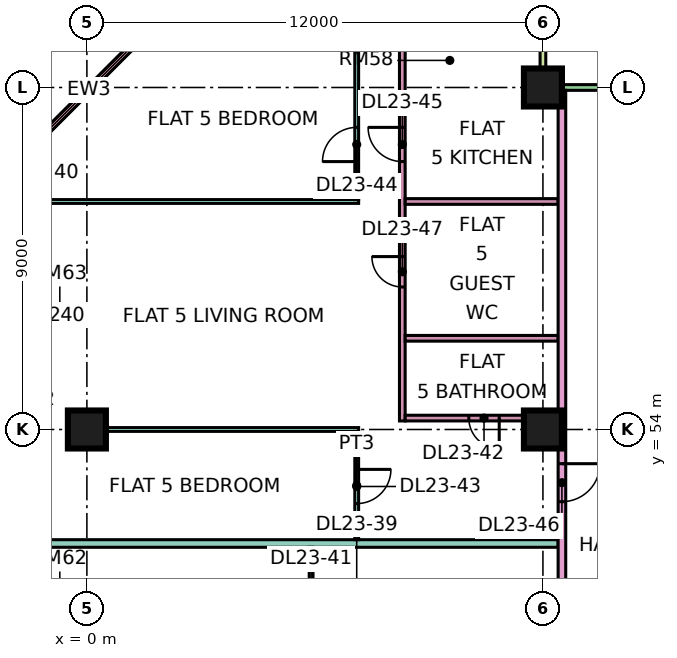
"""IFC4 building model, lengths in metres.
Left out: names, types, materials, properties, quantities, classifications, styles, units other than length and angle.
Written with IfcOpenShell. Run it as: python <this file> out.ifc"""

import sys

from ifc_helpers import new_model, si_unit, direction, frame, frame_2d, origin, origin_2d, place, context, subcontext, project, spatial, rectangle, extrude, element, fill, save


model = new_model("IFC4")
c1 = context("Model", 3, precision=1e-05, world=origin(), true_north=direction((0.0, 1.0)))
c2 = subcontext(c1, "Body", "Model", "MODEL_VIEW")
j1 = project(units=[si_unit("LENGTHUNIT", "METRE"), si_unit("PLANEANGLEUNIT", "RADIAN")], contexts=[c1])
p1 = place(None, origin())
s1 = spatial("IfcSite", under=j1, at=p1, CompositionType="ELEMENT")
p2 = place(p1, origin())
s2 = spatial("IfcBuilding", under=s1, at=p2, CompositionType="ELEMENT")
p3 = place(p2, frame((0.0, 0.0, 103.15)))
s3 = spatial("IfcBuildingStorey", under=s2, at=p3, CompositionType="ELEMENT", Elevation=103.15)
p4 = place(p3, frame((0.0, 54.0, 0.0), z_axis=(0.0, 0.0, 1.0), x_axis=(1.0, 0.0, 0.0)))
e1 = element("IfcColumn", 1, at=p4, inside=s3, PredefinedType="COLUMN", context=c2, shape_type="SweptSolid", body=[
    extrude(rectangle(XDim=1.0, YDim=1.0, at=origin_2d()), origin(), (0.0, 0.0, 1.0), 3.75),
])
for number, where, z_axis, x_axis in (
    (2, (12.0, 54.0, 0.0), (0.0, 0.0, 1.0), (1.0, 0.0, 0.0)),
    (3, (12.0, 63.0, 0.0), (0.0, 0.0, 1.0), (1.0, 0.0, 0.0)),
):
    element("IfcColumn", number, at=place(p3, frame(where, z_axis=z_axis, x_axis=x_axis)), inside=s3, PredefinedType="COLUMN", context=c2, shape_type="SweptSolid", body=[
        extrude(rectangle(XDim=1.0, YDim=1.0, at=origin_2d()), origin(), (0.0, 0.0, 1.0), 3.75),
    ])
p5 = place(p3, frame((22.425, 63.0, 0.0), z_axis=(0.0, 0.0, 1.0), x_axis=(-1.0, 0.0, 0.0)))
e4 = element("IfcWall", 4, at=p5, inside=s3, PredefinedType="SOLIDWALL", context=c2, shape_type="SweptSolid", body=[
    extrude(rectangle(XDim=10.35, YDim=0.15, at=frame_2d((5.175, 0.0))), origin(), (0.0, 0.0, 1.0), 3.35),
])
p6 = place(p5, frame((0.562, 0.0, 0.45)))
e5 = element("IfcOpeningElement", 5, at=p6, cuts=e4, PredefinedType="OPENING", context=c2, shape_type="SweptSolid", body=[
    extrude(rectangle(XDim=1.8, YDim=2.4, at=frame_2d((0.9, 1.2))), frame((0.0, 0.085, 0.0), z_axis=(0.0, -1.0, 0.0), x_axis=(1.0, 0.0, 0.0)), (0.0, 0.0, 1.0), 0.17),
])
p7 = place(p5, frame((3.975, 0.0, 0.0)))
e6 = element("IfcOpeningElement", 6, at=p7, cuts=e4, PredefinedType="OPENING", context=c2, shape_type="SweptSolid", body=[
    extrude(rectangle(XDim=1.8, YDim=2.4, at=frame_2d((0.9, 1.2))), frame((0.0, 0.085, 0.0), z_axis=(0.0, -1.0, 0.0), x_axis=(1.0, 0.0, 0.0)), (0.0, 0.0, 1.0), 0.17),
])
p8 = place(p3, frame((12.0, 64.5, 0.0), z_axis=(0.0, 0.0, 1.0), x_axis=(0.0, -1.0, 0.0)))
e7 = element("IfcWall", 7, at=p8, inside=s3, PredefinedType="SOLIDWALL", context=c2, shape_type="SweptSolid", body=[
    extrude(rectangle(XDim=1.5, YDim=0.15, at=frame_2d((0.75, 0.0))), origin(), (0.0, 0.0, 1.0), 3.35),
])
p9 = place(p3, frame((1.553, 64.447, 0.0), z_axis=(0.0, 0.0, 1.0), x_axis=(-0.707106781187, -0.707106781187, 0.0)))
e8 = element("IfcWall", 8, at=p9, inside=s3, PredefinedType="SOLIDWALL", context=c2, shape_type="SweptSolid", body=[
    extrude(rectangle(XDim=4.243, YDim=0.15, at=frame_2d((2.121, 0.0))), origin(), (0.0, 0.0, 1.0), 3.35),
])
p10 = place(p9, frame((0.621, 0.0, 0.45)))
e9 = element("IfcOpeningElement", 9, at=p10, cuts=e8, PredefinedType="OPENING", context=c2, shape_type="SweptSolid", body=[
    extrude(rectangle(XDim=3.0, YDim=2.4, at=frame_2d((1.5, 1.2))), frame((0.0, 0.085, 0.0), z_axis=(0.0, -1.0, 0.0), x_axis=(1.0, 0.0, 0.0)), (0.0, 0.0, 1.0), 0.17),
])
p11 = place(p3, frame((-1.35, 51.0, 0.0), z_axis=(0.0, 0.0, 1.0), x_axis=(1.0, 0.0, 0.0)))
e10 = element("IfcWall", 10, at=p11, inside=s3, PredefinedType="PARTITIONING", context=c2, shape_type="SweptSolid", body=[
    extrude(rectangle(XDim=13.75, YDim=0.2, at=frame_2d((6.875, 0.0))), origin(), (0.0, 0.0, 1.0), 3.35),
])
e11 = element("IfcWall", 11, at=p4, inside=s3, PredefinedType="PARTITIONING", context=c2, shape_type="SweptSolid", body=[
    extrude(rectangle(XDim=7.15, YDim=0.1, at=frame_2d((3.575, 0.0))), origin(), (0.0, 0.0, 1.0), 3.35),
])
p12 = place(p3, frame((-1.35, 60.0, 0.0), z_axis=(0.0, 0.0, 1.0), x_axis=(1.0, 0.0, 0.0)))
e12 = element("IfcWall", 12, at=p12, inside=s3, PredefinedType="PARTITIONING", context=c2, shape_type="SweptSolid", body=[
    extrude(rectangle(XDim=8.5, YDim=0.1, at=frame_2d((4.25, 0.0))), origin(), (0.0, 0.0, 1.0), 3.35),
])
p13 = place(p3, frame((5.9, 38.95, 0.0), z_axis=(0.0, 0.0, 1.0), x_axis=(0.0, 1.0, 0.0)))
e13 = element("IfcWall", 13, at=p13, inside=s3, PredefinedType="PARTITIONING", context=c2, shape_type="SweptSolid", body=[
    extrude(rectangle(XDim=11.95, YDim=0.1, at=frame_2d((5.975, 0.0))), origin(), (0.0, 0.0, 1.0), 3.35),
])
p14 = place(p13, frame((1.1, 0.0, 0.0)))
e14 = element("IfcOpeningElement", 14, at=p14, cuts=e13, PredefinedType="OPENING", context=c2, shape_type="SweptSolid", body=[
    extrude(rectangle(XDim=0.9, YDim=2.1, at=frame_2d((0.45, 1.05))), frame((0.0, 0.06, 0.0), z_axis=(0.0, -1.0, 0.0), x_axis=(1.0, 0.0, 0.0)), (0.0, 0.0, 1.0), 0.12),
])
p15 = place(p13, frame((4.1, 0.0, 0.0)))
e15 = element("IfcOpeningElement", 15, at=p15, cuts=e13, PredefinedType="OPENING", context=c2, shape_type="SweptSolid", body=[
    extrude(rectangle(XDim=0.9, YDim=2.1, at=frame_2d((0.45, 1.05))), frame((0.0, 0.06, 0.0), z_axis=(0.0, -1.0, 0.0), x_axis=(1.0, 0.0, 0.0)), (0.0, 0.0, 1.0), 0.12),
])
p16 = place(p13, frame((7.1, 0.0, 0.0)))
e16 = element("IfcOpeningElement", 16, at=p16, cuts=e13, PredefinedType="OPENING", context=c2, shape_type="SweptSolid", body=[
    extrude(rectangle(XDim=0.9, YDim=2.1, at=frame_2d((0.45, 1.05))), frame((0.0, 0.06, 0.0), z_axis=(0.0, -1.0, 0.0), x_axis=(1.0, 0.0, 0.0)), (0.0, 0.0, 1.0), 0.12),
])
p17 = place(p13, frame((10.1, 0.0, 0.0)))
e17 = element("IfcOpeningElement", 17, at=p17, cuts=e13, PredefinedType="OPENING", context=c2, shape_type="SweptSolid", body=[
    extrude(rectangle(XDim=0.9, YDim=2.1, at=frame_2d((0.45, 1.05))), frame((0.0, 0.06, 0.0), z_axis=(0.0, -1.0, 0.0), x_axis=(1.0, 0.0, 0.0)), (0.0, 0.0, 1.0), 0.12),
])
p18 = place(p3, frame((7.1, 51.1, 0.0), z_axis=(0.0, 0.0, 1.0), x_axis=(0.0, 1.0, 0.0)))
e18 = element("IfcWall", 18, at=p18, inside=s3, PredefinedType="PARTITIONING", context=c2, shape_type="SweptSolid", body=[
    extrude(rectangle(XDim=2.85, YDim=0.1, at=frame_2d((1.425, 0.0))), origin(), (0.0, 0.0, 1.0), 3.35),
])
p19 = place(p18, frame((0.95, 0.0, 0.0)))
e19 = element("IfcOpeningElement", 19, at=p19, cuts=e18, PredefinedType="OPENING", context=c2, shape_type="SweptSolid", body=[
    extrude(rectangle(XDim=0.9, YDim=2.1, at=frame_2d((0.45, 1.05))), frame((0.0, 0.06, 0.0), z_axis=(0.0, -1.0, 0.0), x_axis=(1.0, 0.0, 0.0)), (0.0, 0.0, 1.0), 0.12),
])
p20 = place(p3, frame((7.1, 60.05, 0.0), z_axis=(0.0, 0.0, 1.0), x_axis=(0.0, 1.0, 0.0)))
e20 = element("IfcWall", 20, at=p20, inside=s3, PredefinedType="PARTITIONING", context=c2, shape_type="SweptSolid", body=[
    extrude(rectangle(XDim=4.3, YDim=0.1, at=frame_2d((2.15, 0.0))), origin(), (0.0, 0.0, 1.0), 3.35),
])
p21 = place(p20, frame((1.0, 0.0, 0.0)))
e21 = element("IfcOpeningElement", 21, at=p21, cuts=e20, PredefinedType="OPENING", context=c2, shape_type="SweptSolid", body=[
    extrude(rectangle(XDim=0.9, YDim=2.1, at=frame_2d((0.45, 1.05))), frame((0.0, 0.06, 0.0), z_axis=(0.0, -1.0, 0.0), x_axis=(1.0, 0.0, 0.0)), (0.0, 0.0, 1.0), 0.12),
])
p22 = place(p3, frame((8.3, 54.225, 0.0), z_axis=(0.0, 0.0, 1.0), x_axis=(0.0, 1.0, 0.0)))
e22 = element("IfcWall", 22, at=p22, inside=s3, PredefinedType="PARTITIONING", context=c2, shape_type="SweptSolid", body=[
    extrude(rectangle(XDim=10.125, YDim=0.15, at=frame_2d((5.062, 0.0))), origin(), (0.0, 0.0, 1.0), 3.35),
])
p23 = place(p22, frame((6.825, 0.0, 0.0)))
e23 = element("IfcOpeningElement", 23, at=p23, cuts=e22, PredefinedType="OPENING", context=c2, shape_type="SweptSolid", body=[
    extrude(rectangle(XDim=0.9, YDim=2.1, at=frame_2d((0.45, 1.05))), frame((0.0, 0.085, 0.0), z_axis=(0.0, -1.0, 0.0), x_axis=(1.0, 0.0, 0.0)), (0.0, 0.0, 1.0), 0.17),
])
p24 = place(p22, frame((3.525, 0.0, 0.0)))
e24 = element("IfcOpeningElement", 24, at=p24, cuts=e22, PredefinedType="OPENING", context=c2, shape_type="SweptSolid", body=[
    extrude(rectangle(XDim=0.8, YDim=2.1, at=frame_2d((0.4, 1.05))), frame((0.0, 0.085, 0.0), z_axis=(0.0, -1.0, 0.0), x_axis=(1.0, 0.0, 0.0)), (0.0, 0.0, 1.0), 0.17),
])
p25 = place(p3, frame((8.375, 54.3, 0.0), z_axis=(0.0, 0.0, 1.0), x_axis=(1.0, 0.0, 0.0)))
e25 = element("IfcWall", 25, at=p25, inside=s3, PredefinedType="PARTITIONING", context=c2, shape_type="SweptSolid", body=[
    extrude(rectangle(XDim=4.025, YDim=0.15, at=frame_2d((2.012, 0.0))), origin(), (0.0, 0.0, 1.0), 3.35),
])
p26 = place(p25, frame((1.675, 0.0, 0.0)))
e26 = element("IfcOpeningElement", 26, at=p26, cuts=e25, PredefinedType="OPENING", context=c2, shape_type="SweptSolid", body=[
    extrude(rectangle(XDim=0.8, YDim=2.1, at=frame_2d((0.4, 1.05))), frame((0.0, 0.085, 0.0), z_axis=(0.0, -1.0, 0.0), x_axis=(1.0, 0.0, 0.0)), (0.0, 0.0, 1.0), 0.17),
])
for number, where, z_axis, x_axis in (
    (27, (8.375, 56.4, 0.0), (0.0, 0.0, 1.0), (1.0, 0.0, 0.0)),
    (28, (8.375, 60.0, 0.0), (0.0, 0.0, 1.0), (1.0, 0.0, 0.0)),
):
    element("IfcWall", number, at=place(p3, frame(where, z_axis=z_axis, x_axis=x_axis)), inside=s3, PredefinedType="PARTITIONING", context=c2, shape_type="SweptSolid", body=[
        extrude(rectangle(XDim=4.025, YDim=0.15, at=frame_2d((2.012, 0.0))), origin(), (0.0, 0.0, 1.0), 3.35),
    ])
p27 = place(p3, frame((12.5, 20.0, 0.0), z_axis=(0.0, 0.0, 1.0), x_axis=(0.0, 1.0, 0.0)))
e29 = element("IfcWall", 29, at=p27, inside=s3, PredefinedType="PARTITIONING", context=c2, shape_type="SweptSolid", body=[
    extrude(rectangle(XDim=42.926, YDim=0.2, at=frame_2d((21.463, 0.0))), origin(), (0.0, 0.0, 1.0), 3.35),
])
p28 = place(p27, frame((28.65, 0.0, 0.0)))
e30 = element("IfcOpeningElement", 30, at=p28, cuts=e29, PredefinedType="OPENING", context=c2, shape_type="SweptSolid", body=[
    extrude(rectangle(XDim=1.0, YDim=2.1, at=frame_2d((0.5, 1.05))), frame((0.0, 0.11, 0.0), z_axis=(0.0, -1.0, 0.0), x_axis=(1.0, 0.0, 0.0)), (0.0, 0.0, 1.0), 0.22),
])
p29 = place(p27, frame((32.1, 0.0, 0.0)))
e31 = element("IfcOpeningElement", 31, at=p29, cuts=e29, PredefinedType="OPENING", context=c2, shape_type="SweptSolid", body=[
    extrude(rectangle(XDim=1.0, YDim=2.1, at=frame_2d((0.5, 1.05))), frame((0.0, 0.11, 0.0), z_axis=(0.0, -1.0, 0.0), x_axis=(1.0, 0.0, 0.0)), (0.0, 0.0, 1.0), 0.22),
])
p30 = place(p27, frame((0.6, 0.0, 0.0)))
e32 = element("IfcOpeningElement", 32, at=p30, cuts=e29, PredefinedType="OPENING", context=c2, shape_type="SweptSolid", body=[
    extrude(rectangle(XDim=1.2, YDim=2.1, at=frame_2d((0.6, 1.05))), frame((0.0, 0.11, 0.0), z_axis=(0.0, -1.0, 0.0), x_axis=(1.0, 0.0, 0.0)), (0.0, 0.0, 1.0), 0.22),
])
p31 = place(p27, frame((13.95, 0.0, 0.0)))
e33 = element("IfcOpeningElement", 33, at=p31, cuts=e29, PredefinedType="OPENING", context=c2, shape_type="SweptSolid", body=[
    extrude(rectangle(XDim=1.0, YDim=2.1, at=frame_2d((0.5, 1.05))), frame((0.0, 0.11, 0.0), z_axis=(0.0, -1.0, 0.0), x_axis=(1.0, 0.0, 0.0)), (0.0, 0.0, 1.0), 0.22),
])
p32 = place(p10, origin())
e34 = element("IfcWindow", 34, at=p32, inside=s3, PartitioningType="SINGLE_PANEL", PredefinedType="WINDOW", context=c2, shape_type="SweptSolid", body=[
    extrude(rectangle(XDim=3.0, YDim=2.4, at=frame_2d((1.5, 1.2))), frame((0.0, 0.03, 0.0), z_axis=(0.0, -1.0, 0.0), x_axis=(1.0, 0.0, 0.0)), (0.0, 0.0, 1.0), 0.06),
])
fill(e9, e34)
p33 = place(p26, origin())
e35 = element("IfcDoor", 35, at=p33, inside=s3, OperationType="SINGLE_SWING_RIGHT", PredefinedType="DOOR", context=c2, shape_type="SweptSolid", body=[
    extrude(rectangle(XDim=0.8, YDim=2.1, at=frame_2d((0.4, 1.05))), frame((0.0, 0.025, 0.0), z_axis=(0.0, -1.0, 0.0), x_axis=(1.0, 0.0, 0.0)), (0.0, 0.0, 1.0), 0.05),
])
fill(e26, e35)
p34 = place(p19, origin())
e36 = element("IfcDoor", 36, at=p34, inside=s3, OperationType="SINGLE_SWING_RIGHT", PredefinedType="DOOR", context=c2, shape_type="SweptSolid", body=[
    extrude(rectangle(XDim=0.9, YDim=2.1, at=frame_2d((0.45, 1.05))), frame((0.0, 0.025, 0.0), z_axis=(0.0, -1.0, 0.0), x_axis=(1.0, 0.0, 0.0)), (0.0, 0.0, 1.0), 0.05),
])
fill(e19, e36)
p35 = place(p21, origin())
e37 = element("IfcDoor", 37, at=p35, inside=s3, OperationType="SINGLE_SWING_LEFT", PredefinedType="DOOR", context=c2, shape_type="SweptSolid", body=[
    extrude(rectangle(XDim=0.9, YDim=2.1, at=frame_2d((0.45, 1.05))), frame((0.0, 0.025, 0.0), z_axis=(0.0, -1.0, 0.0), x_axis=(1.0, 0.0, 0.0)), (0.0, 0.0, 1.0), 0.05),
])
fill(e21, e37)
p36 = place(p23, frame((0.9, 0.0, 0.0), z_axis=(0.0, 0.0, 1.0), x_axis=(-1.0, 0.0, 0.0)))
e38 = element("IfcDoor", 38, at=p36, inside=s3, OperationType="SINGLE_SWING_RIGHT", PredefinedType="DOOR", context=c2, shape_type="SweptSolid", body=[
    extrude(rectangle(XDim=0.9, YDim=2.1, at=frame_2d((0.45, 1.05))), frame((0.0, 0.025, 0.0), z_axis=(0.0, -1.0, 0.0), x_axis=(1.0, 0.0, 0.0)), (0.0, 0.0, 1.0), 0.05),
])
fill(e23, e38)
p37 = place(p29, origin())
e39 = element("IfcDoor", 39, at=p37, inside=s3, OperationType="SINGLE_SWING_RIGHT", PredefinedType="DOOR", context=c2, shape_type="SweptSolid", body=[
    extrude(rectangle(XDim=1.0, YDim=2.1, at=frame_2d((0.5, 1.05))), frame((0.0, 0.025, 0.0), z_axis=(0.0, -1.0, 0.0), x_axis=(1.0, 0.0, 0.0)), (0.0, 0.0, 1.0), 0.05),
])
fill(e31, e39)
p38 = place(p24, frame((0.8, 0.0, 0.0), z_axis=(0.0, 0.0, 1.0), x_axis=(-1.0, 0.0, 0.0)))
e40 = element("IfcDoor", 40, at=p38, inside=s3, OperationType="SINGLE_SWING_RIGHT", PredefinedType="DOOR", context=c2, shape_type="SweptSolid", body=[
    extrude(rectangle(XDim=0.8, YDim=2.1, at=frame_2d((0.4, 1.05))), frame((0.0, 0.025, 0.0), z_axis=(0.0, -1.0, 0.0), x_axis=(1.0, 0.0, 0.0)), (0.0, 0.0, 1.0), 0.05),
])
fill(e24, e40)
save(model, sys.argv[1])
